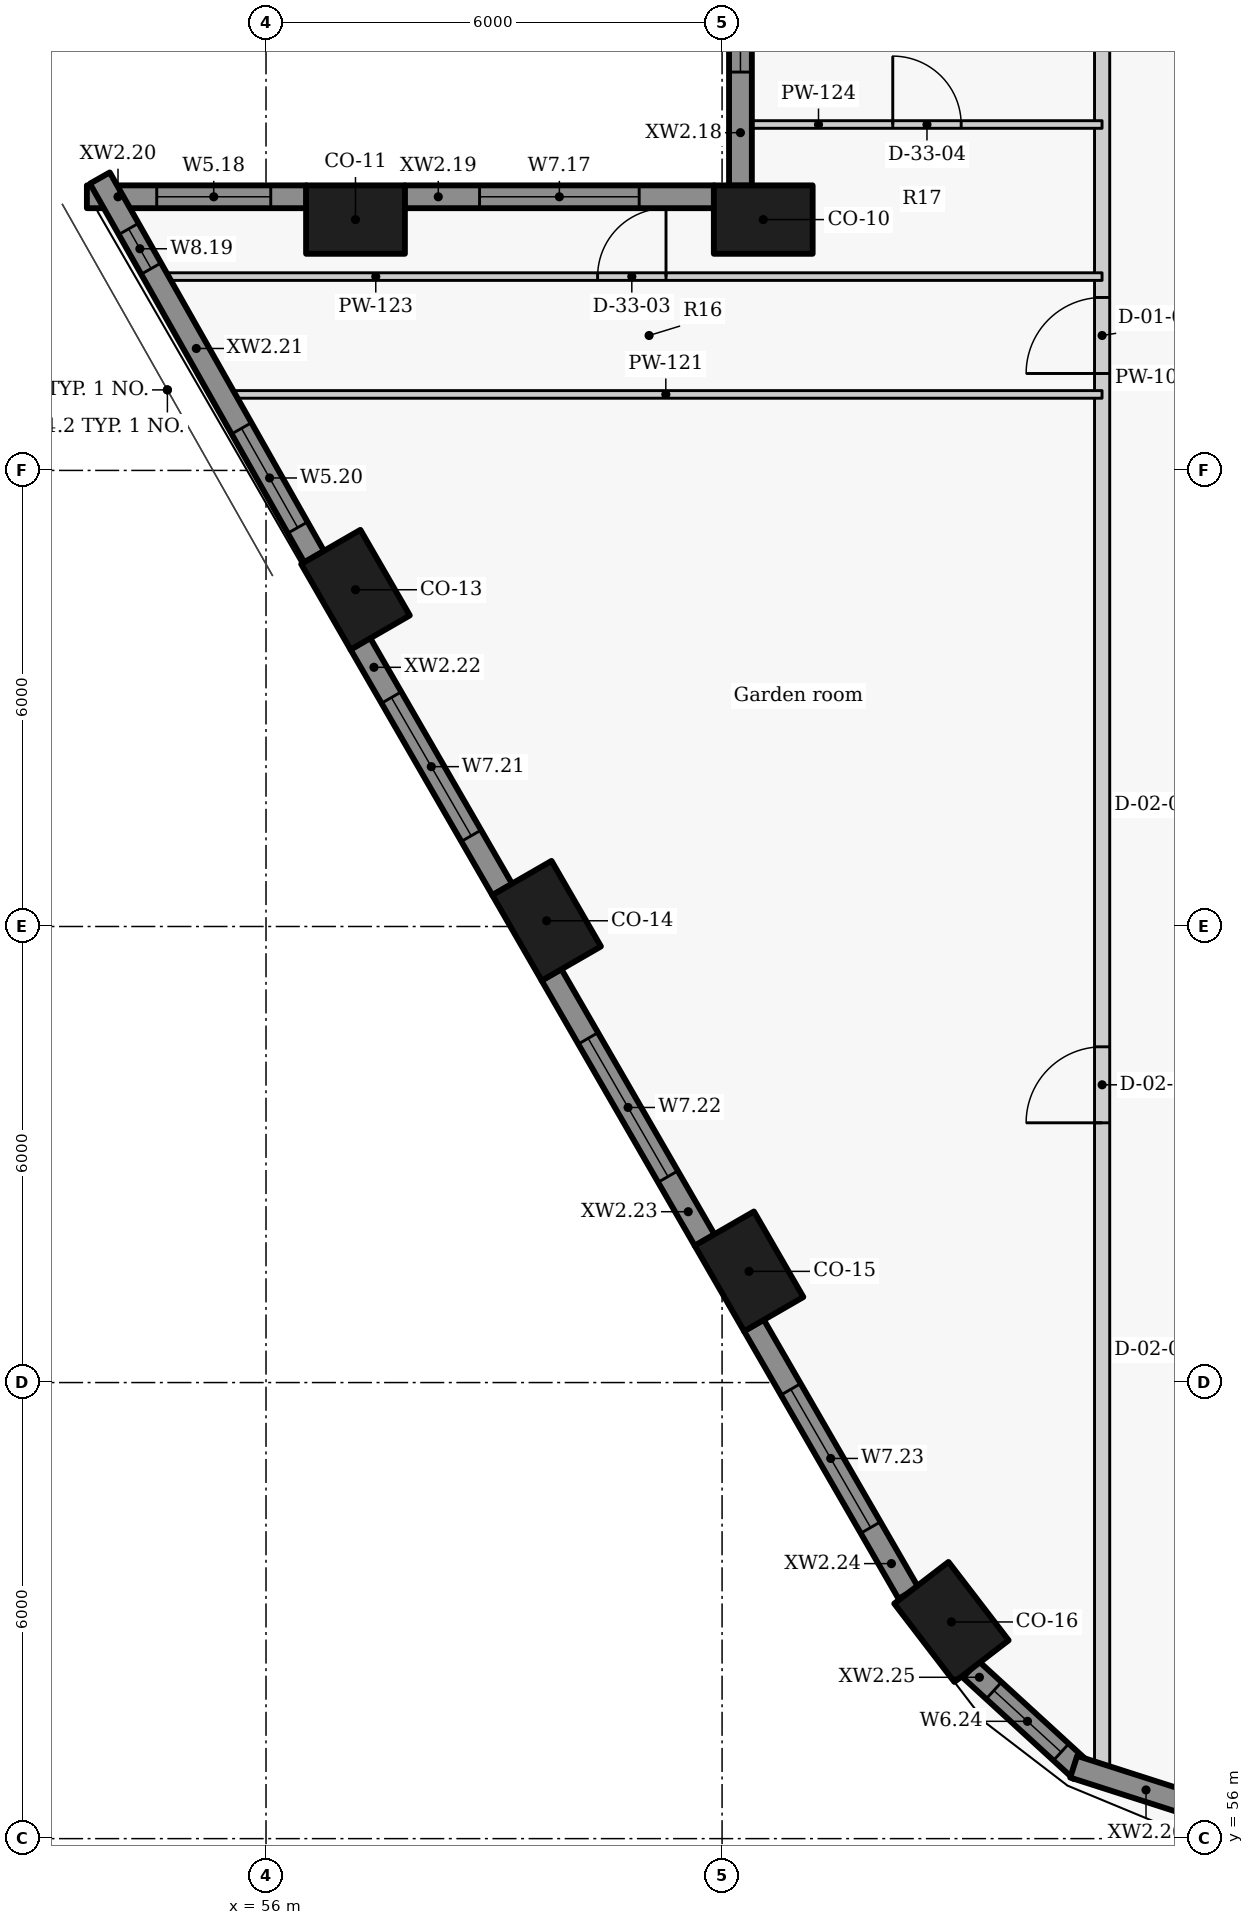
"""IFC4 building model, lengths in metres.
Left out: names, types, materials, properties, quantities, classifications, styles, units other than length and angle.
Written with IfcOpenShell. Run it as: python <this file> out.ifc"""

import sys

from ifc_helpers import new_model, si_unit, direction, frame, frame_2d, origin, origin_2d, place, context, subcontext, project, spatial, rectangle, extrude, element, fill, save


model = new_model("IFC4")
c1 = context("Model", 3, precision=1e-05, world=origin(), true_north=direction((0.0, 1.0)))
c2 = subcontext(c1, "Body", "Model", "MODEL_VIEW")
j1 = project(units=[si_unit("LENGTHUNIT", "METRE"), si_unit("PLANEANGLEUNIT", "RADIAN")], contexts=[c1])
p1 = place(None, origin())
s1 = spatial("IfcSite", under=j1, at=p1, CompositionType="ELEMENT")
p2 = place(p1, origin())
s2 = spatial("IfcBuilding", under=s1, at=p2, CompositionType="ELEMENT")
p3 = place(p2, frame((0.0, 0.0, 150.3)))
s3 = spatial("IfcBuildingStorey", under=s2, at=p3, CompositionType="ELEMENT", Elevation=150.3)
for number, where, z_axis, x_axis in (
    (1, (62.542, 77.3, 0.0), (0.0, 0.0, 1.0), (-1.0, 0.0, 0.0)),
    (2, (57.177, 77.3, 0.0), (0.0, 0.0, 1.0), (-1.0, 0.0, 0.0)),
    (3, (57.177, 72.43, 0.0), (0.0, 0.0, 1.0), (0.5, -0.866, 0.0)),
    (4, (59.692, 68.075, 0.0), (0.0, 0.0, 1.0), (0.5, -0.866, 0.0)),
    (5, (62.354, 63.463, 0.0), (0.0, 0.0, 1.0), (0.5, -0.866, 0.0)),
    (6, (65.018, 58.851, 0.0), (0.0, 0.0, 1.0), (0.609, -0.793, 0.0)),
):
    element("IfcColumn", number, at=place(p3, frame(where, z_axis=z_axis, x_axis=x_axis)), inside=s3, PredefinedType="COLUMN", context=c2, shape_type="SweptSolid", body=[
        extrude(rectangle(XDim=1.3, YDim=0.9, at=origin_2d()), origin(), (0.0, 0.0, 1.0), 3.3),
    ])
p4 = place(p3, frame((62.242, 82.054, 0.0), z_axis=(0.0, 0.0, 1.0), x_axis=(0.0, -1.0, 0.0)))
e7 = element("IfcWall", 7, at=p4, inside=s3, PredefinedType="SOLIDWALL", context=c2, shape_type="SweptSolid", body=[
    extrude(rectangle(XDim=4.308, YDim=0.3, at=frame_2d((2.154, 0.0))), origin(), (0.0, 0.0, 1.0), 2.425),
])
p5 = place(p4, frame((0.713, 0.0, 0.9)))
e8 = element("IfcOpeningElement", 8, at=p5, cuts=e7, PredefinedType="OPENING", context=c2, shape_type="SweptSolid", body=[
    extrude(rectangle(XDim=2.1, YDim=1.1, at=frame_2d((1.05, 0.55))), frame((0.0, 0.16, 0.0), z_axis=(0.0, -1.0, 0.0), x_axis=(1.0, 0.0, 0.0)), (0.0, 0.0, 1.0), 0.32),
])
p6 = place(p3, frame((61.896, 77.6, 0.0), z_axis=(0.0, 0.0, 1.0), x_axis=(-1.0, 0.0, 0.0)))
e9 = element("IfcWall", 9, at=p6, inside=s3, PredefinedType="SOLIDWALL", context=c2, shape_type="SweptSolid", body=[
    extrude(rectangle(XDim=4.073, YDim=0.3, at=frame_2d((2.036, 0.0))), origin(), (0.0, 0.0, 1.0), 2.425),
])
p7 = place(p6, frame((0.986, 0.0, 0.9)))
e10 = element("IfcOpeningElement", 10, at=p7, cuts=e9, PredefinedType="OPENING", context=c2, shape_type="SweptSolid", body=[
    extrude(rectangle(XDim=2.1, YDim=1.1, at=frame_2d((1.05, 0.55))), frame((0.0, 0.16, 0.0), z_axis=(0.0, -1.0, 0.0), x_axis=(1.0, 0.0, 0.0)), (0.0, 0.0, 1.0), 0.32),
])
p8 = place(p3, frame((56.531, 77.6, 0.0), z_axis=(0.0, 0.0, 1.0), x_axis=(-1.0, 0.0, 0.0)))
e11 = element("IfcWall", 11, at=p8, inside=s3, PredefinedType="SOLIDWALL", context=c2, shape_type="SweptSolid", body=[
    extrude(rectangle(XDim=2.888, YDim=0.3, at=frame_2d((1.444, 0.0))), origin(), (0.0, 0.0, 1.0), 2.425),
])
p9 = place(p8, frame((0.469, 0.0, 0.9)))
e12 = element("IfcOpeningElement", 12, at=p9, cuts=e11, PredefinedType="OPENING", context=c2, shape_type="SweptSolid", body=[
    extrude(rectangle(XDim=1.5, YDim=1.1, at=frame_2d((0.75, 0.55))), frame((0.0, 0.16, 0.0), z_axis=(0.0, -1.0, 0.0), x_axis=(1.0, 0.0, 0.0)), (0.0, 0.0, 1.0), 0.32),
])
p10 = place(p3, frame((53.814, 77.847, 0.0), z_axis=(0.0, 0.0, 1.0), x_axis=(0.492498306264, -0.87031340236, 0.0)))
e13 = element("IfcWall", 13, at=p10, inside=s3, PredefinedType="SOLIDWALL", context=c2, shape_type="SweptSolid", body=[
    extrude(rectangle(XDim=5.727, YDim=0.3, at=frame_2d((2.863, 0.0))), origin(), (0.0, 0.0, 1.0), 2.425),
])
p11 = place(p10, frame((0.769, 0.0, 0.9)))
e14 = element("IfcOpeningElement", 14, at=p11, cuts=e13, PredefinedType="OPENING", context=c2, shape_type="SweptSolid", body=[
    extrude(rectangle(XDim=0.6, YDim=1.1, at=frame_2d((0.3, 0.55))), frame((0.0, 0.16, 0.0), z_axis=(0.0, -1.0, 0.0), x_axis=(1.0, 0.0, 0.0)), (0.0, 0.0, 1.0), 0.32),
])
p12 = place(p10, frame((3.784, 0.0, 0.9)))
e15 = element("IfcOpeningElement", 15, at=p12, cuts=e13, PredefinedType="OPENING", context=c2, shape_type="SweptSolid", body=[
    extrude(rectangle(XDim=1.5, YDim=1.1, at=frame_2d((0.75, 0.55))), frame((0.0, 0.16, 0.0), z_axis=(0.0, -1.0, 0.0), x_axis=(1.0, 0.0, 0.0)), (0.0, 0.0, 1.0), 0.32),
])
p13 = place(p3, frame((57.24, 71.721, 0.0), z_axis=(0.0, 0.0, 1.0), x_axis=(0.499933594891, -0.866063739398, 0.0)))
e16 = element("IfcWall", 16, at=p13, inside=s3, PredefinedType="SOLIDWALL", context=c2, shape_type="SweptSolid", body=[
    extrude(rectangle(XDim=3.737, YDim=0.3, at=frame_2d((1.868, 0.0))), origin(), (0.0, 0.0, 1.0), 2.425),
])
p14 = place(p13, frame((0.818, 0.0, 0.9)))
e17 = element("IfcOpeningElement", 17, at=p14, cuts=e16, PredefinedType="OPENING", context=c2, shape_type="SweptSolid", body=[
    extrude(rectangle(XDim=2.1, YDim=1.1, at=frame_2d((1.05, 0.55))), frame((0.0, 0.16, 0.0), z_axis=(0.0, -1.0, 0.0), x_axis=(1.0, 0.0, 0.0)), (0.0, 0.0, 1.0), 0.32),
])
p15 = place(p3, frame((59.755, 67.366, 0.0), z_axis=(0.0, 0.0, 1.0), x_axis=(0.500031546601, -0.86600718958, 0.0)))
e18 = element("IfcWall", 18, at=p15, inside=s3, PredefinedType="SOLIDWALL", context=c2, shape_type="SweptSolid", body=[
    extrude(rectangle(XDim=4.034, YDim=0.3, at=frame_2d((2.017, 0.0))), origin(), (0.0, 0.0, 1.0), 2.425),
])
p16 = place(p15, frame((0.967, 0.0, 0.9)))
e19 = element("IfcOpeningElement", 19, at=p16, cuts=e18, PredefinedType="OPENING", context=c2, shape_type="SweptSolid", body=[
    extrude(rectangle(XDim=2.1, YDim=1.1, at=frame_2d((1.05, 0.55))), frame((0.0, 0.16, 0.0), z_axis=(0.0, -1.0, 0.0), x_axis=(1.0, 0.0, 0.0)), (0.0, 0.0, 1.0), 0.32),
])
p17 = place(p3, frame((62.418, 62.753, 0.0), z_axis=(0.0, 0.0, 1.0), x_axis=(0.500018589245, -0.866014671013, 0.0)))
e20 = element("IfcWall", 20, at=p17, inside=s3, PredefinedType="SOLIDWALL", context=c2, shape_type="SweptSolid", body=[
    extrude(rectangle(XDim=4.068, YDim=0.3, at=frame_2d((2.034, 0.0))), origin(), (0.0, 0.0, 1.0), 2.425),
])
p18 = place(p17, frame((0.973, 0.0, 0.9)))
e21 = element("IfcOpeningElement", 21, at=p18, cuts=e20, PredefinedType="OPENING", context=c2, shape_type="SweptSolid", body=[
    extrude(rectangle(XDim=2.1, YDim=1.1, at=frame_2d((1.05, 0.55))), frame((0.0, 0.16, 0.0), z_axis=(0.0, -1.0, 0.0), x_axis=(1.0, 0.0, 0.0)), (0.0, 0.0, 1.0), 0.32),
])
p19 = place(p3, frame((65.269, 58.229, 0.0), z_axis=(0.0, 0.0, 1.0), x_axis=(0.737487298625, -0.675361002995, 0.0)))
e22 = element("IfcWall", 22, at=p19, inside=s3, PredefinedType="SOLIDWALL", context=c2, shape_type="SweptSolid", body=[
    extrude(rectangle(XDim=1.977, YDim=0.3, at=frame_2d((0.988, 0.0))), origin(), (0.0, 0.0, 1.0), 2.425),
])
p20 = place(p19, frame((0.416, 0.0, 0.9)))
e23 = element("IfcOpeningElement", 23, at=p20, cuts=e22, PredefinedType="OPENING", context=c2, shape_type="SweptSolid", body=[
    extrude(rectangle(XDim=1.2, YDim=1.1, at=frame_2d((0.6, 0.55))), frame((0.0, 0.16, 0.0), z_axis=(0.0, -1.0, 0.0), x_axis=(1.0, 0.0, 0.0)), (0.0, 0.0, 1.0), 0.32),
])
p21 = place(p3, frame((66.626, 56.946, 0.0), z_axis=(0.0, 0.0, 1.0), x_axis=(0.952201240673, -0.305471434444, 0.0)))
e24 = element("IfcWall", 24, at=p21, inside=s3, PredefinedType="SOLIDWALL", context=c2, shape_type="SweptSolid", body=[
    extrude(rectangle(XDim=1.999, YDim=0.3, at=frame_2d((1.0, 0.0))), origin(), (0.0, 0.0, 1.0), 2.425),
])
p22 = place(p3, frame((67.0, 56.833, 0.0), z_axis=(0.0, 0.0, 1.0), x_axis=(0.0, 1.0, 0.0)))
e25 = element("IfcWall", 25, at=p22, inside=s3, PredefinedType="PARTITIONING", context=c2, shape_type="SweptSolid", body=[
    extrude(rectangle(XDim=45.661, YDim=0.2, at=frame_2d((22.831, 0.0))), origin(), (0.0, 0.0, 1.0), 2.405),
])
p23 = place(p22, frame((8.584, 0.0, 0.0)))
e26 = element("IfcOpeningElement", 26, at=p23, cuts=e25, PredefinedType="OPENING", context=c2, shape_type="SweptSolid", body=[
    extrude(rectangle(XDim=1.0, YDim=2.1, at=frame_2d((0.5, 1.05))), frame((0.0, 0.11, 0.0), z_axis=(0.0, -1.0, 0.0), x_axis=(1.0, 0.0, 0.0)), (0.0, 0.0, 1.0), 0.22),
])
p24 = place(p22, frame((18.442, 0.0, 0.0)))
e27 = element("IfcOpeningElement", 27, at=p24, cuts=e25, PredefinedType="OPENING", context=c2, shape_type="SweptSolid", body=[
    extrude(rectangle(XDim=1.0, YDim=2.1, at=frame_2d((0.5, 1.05))), frame((0.0, 0.11, 0.0), z_axis=(0.0, -1.0, 0.0), x_axis=(1.0, 0.0, 0.0)), (0.0, 0.0, 1.0), 0.22),
])
p25 = place(p22, frame((28.467, 0.0, 0.0)))
e28 = element("IfcOpeningElement", 28, at=p25, cuts=e25, PredefinedType="OPENING", context=c2, shape_type="SweptSolid", body=[
    extrude(rectangle(XDim=1.0, YDim=2.1, at=frame_2d((0.5, 1.05))), frame((0.0, 0.11, 0.0), z_axis=(0.0, -1.0, 0.0), x_axis=(1.0, 0.0, 0.0)), (0.0, 0.0, 1.0), 0.22),
])
p26 = place(p22, frame((40.953, 0.0, 0.0)))
e29 = element("IfcOpeningElement", 29, at=p26, cuts=e25, PredefinedType="OPENING", context=c2, shape_type="SweptSolid", body=[
    extrude(rectangle(XDim=1.0, YDim=2.1, at=frame_2d((0.5, 1.05))), frame((0.0, 0.11, 0.0), z_axis=(0.0, -1.0, 0.0), x_axis=(1.0, 0.0, 0.0)), (0.0, 0.0, 1.0), 0.22),
])
p27 = place(p3, frame((55.521, 75.0, 0.0), z_axis=(0.0, 0.0, 1.0), x_axis=(1.0, 0.0, 0.0)))
e30 = element("IfcWall", 30, at=p27, inside=s3, PredefinedType="PARTITIONING", context=c2, shape_type="SweptSolid", body=[
    extrude(rectangle(XDim=11.479, YDim=0.1, at=frame_2d((5.739, 0.0))), origin(), (0.0, 0.0, 1.0), 2.405),
])
p28 = place(p3, frame((54.625, 76.55, 0.0), z_axis=(0.0, 0.0, 1.0), x_axis=(1.0, 0.0, 0.0)))
e31 = element("IfcWall", 31, at=p28, inside=s3, PredefinedType="PARTITIONING", context=c2, shape_type="SweptSolid", body=[
    extrude(rectangle(XDim=12.374, YDim=0.1, at=frame_2d((6.187, 0.0))), origin(), (0.0, 0.0, 1.0), 2.405),
])
p29 = place(p28, frame((5.737, 0.0, 0.0)))
e32 = element("IfcOpeningElement", 32, at=p29, cuts=e31, PredefinedType="OPENING", context=c2, shape_type="SweptSolid", body=[
    extrude(rectangle(XDim=0.9, YDim=2.1, at=frame_2d((0.45, 1.05))), frame((0.0, 0.06, 0.0), z_axis=(0.0, -1.0, 0.0), x_axis=(1.0, 0.0, 0.0)), (0.0, 0.0, 1.0), 0.12),
])
p30 = place(p3, frame((62.392, 78.551, 0.0), z_axis=(0.0, 0.0, 1.0), x_axis=(1.0, 0.0, 0.0)))
e33 = element("IfcWall", 33, at=p30, inside=s3, PredefinedType="PARTITIONING", context=c2, shape_type="SweptSolid", body=[
    extrude(rectangle(XDim=4.607, YDim=0.1, at=frame_2d((2.304, 0.0))), origin(), (0.0, 0.0, 1.0), 2.405),
])
p31 = place(p30, frame((1.854, 0.0, 0.0)))
e34 = element("IfcOpeningElement", 34, at=p31, cuts=e33, PredefinedType="OPENING", context=c2, shape_type="SweptSolid", body=[
    extrude(rectangle(XDim=0.9, YDim=2.1, at=frame_2d((0.45, 1.05))), frame((0.0, 0.06, 0.0), z_axis=(0.0, -1.0, 0.0), x_axis=(1.0, 0.0, 0.0)), (0.0, 0.0, 1.0), 0.12),
])
p32 = place(p5, origin())
e35 = element("IfcWindow", 35, at=p32, inside=s3, PartitioningType="SINGLE_PANEL", PredefinedType="WINDOW", context=c2, shape_type="SweptSolid", body=[
    extrude(rectangle(XDim=2.1, YDim=1.1, at=frame_2d((1.05, 0.55))), frame((0.0, 0.03, 0.0), z_axis=(0.0, -1.0, 0.0), x_axis=(1.0, 0.0, 0.0)), (0.0, 0.0, 1.0), 0.06),
])
fill(e8, e35)
p33 = place(p7, origin())
e36 = element("IfcWindow", 36, at=p33, inside=s3, PartitioningType="SINGLE_PANEL", PredefinedType="WINDOW", context=c2, shape_type="SweptSolid", body=[
    extrude(rectangle(XDim=2.1, YDim=1.1, at=frame_2d((1.05, 0.55))), frame((0.0, 0.03, 0.0), z_axis=(0.0, -1.0, 0.0), x_axis=(1.0, 0.0, 0.0)), (0.0, 0.0, 1.0), 0.06),
])
fill(e10, e36)
p34 = place(p9, origin())
e37 = element("IfcWindow", 37, at=p34, inside=s3, PartitioningType="SINGLE_PANEL", PredefinedType="WINDOW", context=c2, shape_type="SweptSolid", body=[
    extrude(rectangle(XDim=1.5, YDim=1.1, at=frame_2d((0.75, 0.55))), frame((0.0, 0.03, 0.0), z_axis=(0.0, -1.0, 0.0), x_axis=(1.0, 0.0, 0.0)), (0.0, 0.0, 1.0), 0.06),
])
fill(e12, e37)
p35 = place(p11, origin())
e38 = element("IfcWindow", 38, at=p35, inside=s3, PartitioningType="SINGLE_PANEL", PredefinedType="WINDOW", context=c2, shape_type="SweptSolid", body=[
    extrude(rectangle(XDim=0.6, YDim=1.1, at=frame_2d((0.3, 0.55))), frame((0.0, 0.03, 0.0), z_axis=(0.0, -1.0, 0.0), x_axis=(1.0, 0.0, 0.0)), (0.0, 0.0, 1.0), 0.06),
])
fill(e14, e38)
p36 = place(p12, origin())
e39 = element("IfcWindow", 39, at=p36, inside=s3, PartitioningType="SINGLE_PANEL", PredefinedType="WINDOW", context=c2, shape_type="SweptSolid", body=[
    extrude(rectangle(XDim=1.5, YDim=1.1, at=frame_2d((0.75, 0.55))), frame((0.0, 0.03, 0.0), z_axis=(0.0, -1.0, 0.0), x_axis=(1.0, 0.0, 0.0)), (0.0, 0.0, 1.0), 0.06),
])
fill(e15, e39)
p37 = place(p14, origin())
e40 = element("IfcWindow", 40, at=p37, inside=s3, PartitioningType="SINGLE_PANEL", PredefinedType="WINDOW", context=c2, shape_type="SweptSolid", body=[
    extrude(rectangle(XDim=2.1, YDim=1.1, at=frame_2d((1.05, 0.55))), frame((0.0, 0.03, 0.0), z_axis=(0.0, -1.0, 0.0), x_axis=(1.0, 0.0, 0.0)), (0.0, 0.0, 1.0), 0.06),
])
fill(e17, e40)
p38 = place(p16, origin())
e41 = element("IfcWindow", 41, at=p38, inside=s3, PartitioningType="SINGLE_PANEL", PredefinedType="WINDOW", context=c2, shape_type="SweptSolid", body=[
    extrude(rectangle(XDim=2.1, YDim=1.1, at=frame_2d((1.05, 0.55))), frame((0.0, 0.03, 0.0), z_axis=(0.0, -1.0, 0.0), x_axis=(1.0, 0.0, 0.0)), (0.0, 0.0, 1.0), 0.06),
])
fill(e19, e41)
p39 = place(p18, origin())
e42 = element("IfcWindow", 42, at=p39, inside=s3, PartitioningType="SINGLE_PANEL", PredefinedType="WINDOW", context=c2, shape_type="SweptSolid", body=[
    extrude(rectangle(XDim=2.1, YDim=1.1, at=frame_2d((1.05, 0.55))), frame((0.0, 0.03, 0.0), z_axis=(0.0, -1.0, 0.0), x_axis=(1.0, 0.0, 0.0)), (0.0, 0.0, 1.0), 0.06),
])
fill(e21, e42)
p40 = place(p20, origin())
e43 = element("IfcWindow", 43, at=p40, inside=s3, PartitioningType="SINGLE_PANEL", PredefinedType="WINDOW", context=c2, shape_type="SweptSolid", body=[
    extrude(rectangle(XDim=1.2, YDim=1.1, at=frame_2d((0.6, 0.55))), frame((0.0, 0.03, 0.0), z_axis=(0.0, -1.0, 0.0), x_axis=(1.0, 0.0, 0.0)), (0.0, 0.0, 1.0), 0.06),
])
fill(e23, e43)
p41 = place(p23, origin())
e44 = element("IfcDoor", 44, at=p41, inside=s3, OperationType="SINGLE_SWING_LEFT", PredefinedType="DOOR", context=c2, shape_type="SweptSolid", body=[
    extrude(rectangle(XDim=1.0, YDim=2.1, at=frame_2d((0.5, 1.05))), frame((0.0, 0.025, 0.0), z_axis=(0.0, -1.0, 0.0), x_axis=(1.0, 0.0, 0.0)), (0.0, 0.0, 1.0), 0.05),
])
fill(e26, e44)
p42 = place(p24, origin())
e45 = element("IfcDoor", 45, at=p42, inside=s3, OperationType="SINGLE_SWING_LEFT", PredefinedType="DOOR", context=c2, shape_type="SweptSolid", body=[
    extrude(rectangle(XDim=1.0, YDim=2.1, at=frame_2d((0.5, 1.05))), frame((0.0, 0.025, 0.0), z_axis=(0.0, -1.0, 0.0), x_axis=(1.0, 0.0, 0.0)), (0.0, 0.0, 1.0), 0.05),
])
fill(e27, e45)
p43 = place(p29, origin())
e46 = element("IfcDoor", 46, at=p43, inside=s3, OperationType="SINGLE_SWING_RIGHT", PredefinedType="DOOR", context=c2, shape_type="SweptSolid", body=[
    extrude(rectangle(XDim=0.9, YDim=2.1, at=frame_2d((0.45, 1.05))), frame((0.0, 0.025, 0.0), z_axis=(0.0, -1.0, 0.0), x_axis=(1.0, 0.0, 0.0)), (0.0, 0.0, 1.0), 0.05),
])
fill(e32, e46)
p44 = place(p31, origin())
e47 = element("IfcDoor", 47, at=p44, inside=s3, OperationType="SINGLE_SWING_LEFT", PredefinedType="DOOR", context=c2, shape_type="SweptSolid", body=[
    extrude(rectangle(XDim=0.9, YDim=2.1, at=frame_2d((0.45, 1.05))), frame((0.0, 0.025, 0.0), z_axis=(0.0, -1.0, 0.0), x_axis=(1.0, 0.0, 0.0)), (0.0, 0.0, 1.0), 0.05),
])
fill(e34, e47)
save(model, sys.argv[1])
